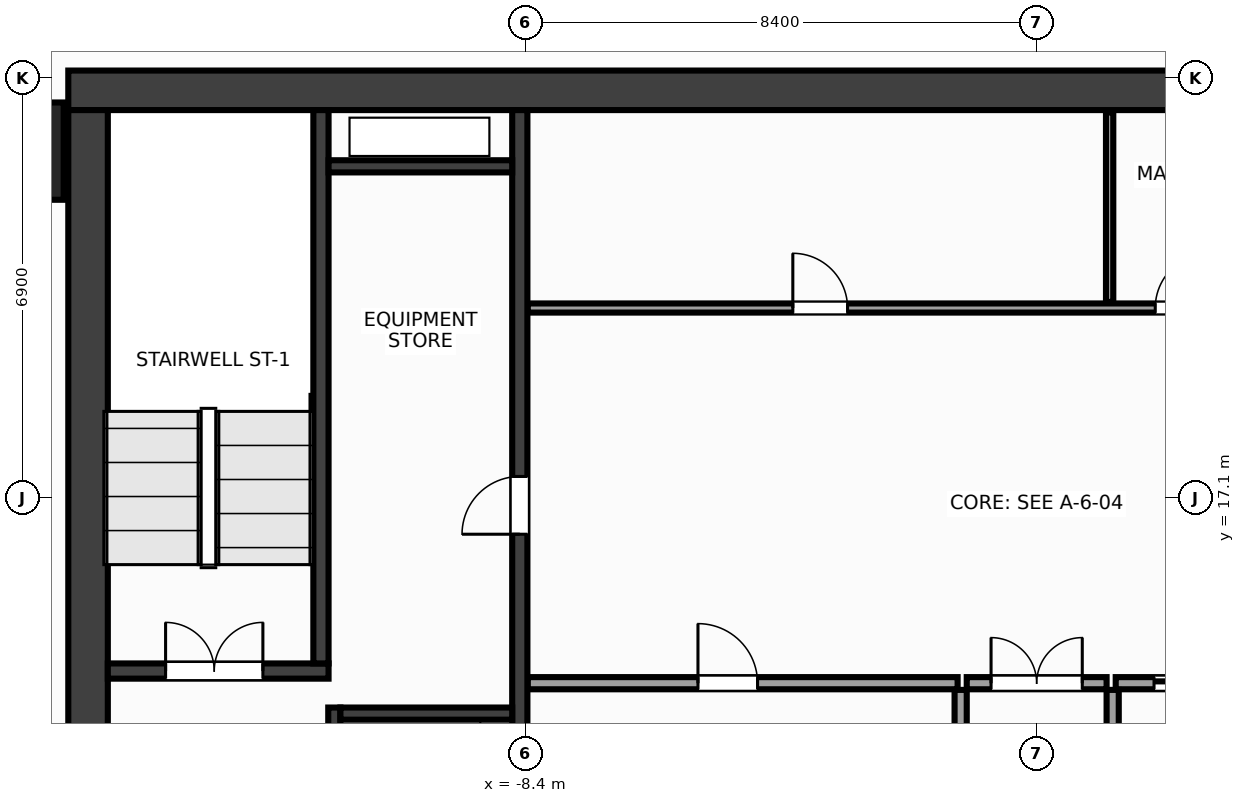
"""IFC4 building model, lengths in metres.
Left out: names, types, materials, properties, quantities, classifications, styles, units other than length and angle.
Written with IfcOpenShell. Run it as: python <this file> out.ifc"""

import sys

from ifc_helpers import new_model, si_unit, direction, frame, frame_2d, origin, origin_2d, place, context, subcontext, project, spatial, rectangle, extrude, source, transform, mapped, element, fill, save


model = new_model("IFC4")
c1 = context("Model", 3, precision=1e-05, world=origin(), true_north=direction((0.0, 1.0)))
c2 = subcontext(c1, "Body", "Model", "MODEL_VIEW")
j1 = project(units=[si_unit("LENGTHUNIT", "METRE"), si_unit("PLANEANGLEUNIT", "RADIAN")], contexts=[c1])
p1 = place(None, origin())
s1 = spatial("IfcSite", under=j1, at=p1, CompositionType="ELEMENT")
p2 = place(p1, origin())
s2 = spatial("IfcBuilding", under=s1, at=p2, CompositionType="ELEMENT")
p3 = place(p2, frame((0.0, 0.0, 88.4)))
s3 = spatial("IfcBuildingStorey", under=s2, at=p3, CompositionType="ELEMENT", Elevation=88.4)
m1 = source(origin(), c2, "Body", "SweptSolid", [
    extrude(rectangle(XDim=31.85, YDim=0.65, at=frame_2d((15.925, 0.0))), origin(), (0.0, 0.0, 1.0), 3.6),
])
p4 = place(p3, frame((-15.925, 23.8, 0.0), z_axis=(0.0, 0.0, 1.0), x_axis=(1.0, 0.0, 0.0)))
e1 = element("IfcWall", 1, at=p4, inside=s3, PredefinedType="SHEAR", context=c2, shape_type="MappedRepresentation", body=[
    mapped(m1, transform((0.0, 0.0, 0.0), x_axis=(1.0, 0.0, 0.0), y_axis=(0.0, 1.0, 0.0), z_axis=(0.0, 0.0, 1.0), scale=1.0)),
])
m2 = source(origin(), c2, "Body", "SweptSolid", [
    extrude(rectangle(XDim=12.95, YDim=0.65, at=frame_2d((6.475, 0.0))), origin(), (0.0, 0.0, 1.0), 3.6),
])
p5 = place(p3, frame((-15.6, 10.525, 0.0), z_axis=(0.0, 0.0, 1.0), x_axis=(0.0, 1.0, 0.0)))
e2 = element("IfcWall", 2, at=p5, inside=s3, PredefinedType="SHEAR", context=c2, shape_type="MappedRepresentation", body=[
    mapped(m2, transform((0.0, 0.0, 0.0), x_axis=(1.0, 0.0, 0.0), y_axis=(0.0, 1.0, 0.0), z_axis=(0.0, 0.0, 1.0), scale=1.0)),
])
m3 = source(origin(), c2, "Body", "SweptSolid", [
    extrude(rectangle(XDim=12.95, YDim=0.25, at=frame_2d((6.475, 0.0))), origin(), (0.0, 0.0, 1.0), 3.6),
])
p6 = place(p3, frame((-8.5, 10.525, 0.0), z_axis=(0.0, 0.0, 1.0), x_axis=(0.0, 1.0, 0.0)))
e3 = element("IfcWall", 3, at=p6, inside=s3, PredefinedType="SHEAR", context=c2, shape_type="MappedRepresentation", body=[
    mapped(m3, transform((0.0, 0.0, 0.0), x_axis=(1.0, 0.0, 0.0), y_axis=(0.0, 1.0, 0.0), z_axis=(0.0, 0.0, 1.0), scale=1.0)),
])
p7 = place(p6, frame((5.975, 0.0, 0.0)))
e4 = element("IfcOpeningElement", 4, at=p7, cuts=e3, PredefinedType="OPENING", context=c2, shape_type="SweptSolid", body=[
    extrude(rectangle(XDim=0.95, YDim=2.15, at=frame_2d((0.475, 1.075))), frame((0.0, 0.137, 0.0), z_axis=(0.0, -1.0, 0.0), x_axis=(1.0, 0.0, 0.0)), (0.0, 0.0, 1.0), 0.274),
])
m4 = source(origin(), c2, "Body", "SweptSolid", [
    extrude(rectangle(XDim=3.63, YDim=0.25, at=frame_2d((1.815, 0.0))), origin(), (0.0, 0.0, 1.0), 3.6),
])
p8 = place(p3, frame((-15.275, 14.25, 0.0), z_axis=(0.0, 0.0, 1.0), x_axis=(1.0, 0.0, 0.0)))
e5 = element("IfcWall", 5, at=p8, inside=s3, PredefinedType="SHEAR", context=c2, shape_type="MappedRepresentation", body=[
    mapped(m4, transform((0.0, 0.0, 0.0), x_axis=(1.0, 0.0, 0.0), y_axis=(0.0, 1.0, 0.0), z_axis=(0.0, 0.0, 1.0), scale=1.0)),
])
p9 = place(p8, frame((0.95, 0.0, 0.0)))
e6 = element("IfcOpeningElement", 6, at=p9, cuts=e5, PredefinedType="OPENING", context=c2, shape_type="SweptSolid", body=[
    extrude(rectangle(XDim=1.6, YDim=2.15, at=frame_2d((0.8, 1.075))), frame((0.0, 0.137, 0.0), z_axis=(0.0, -1.0, 0.0), x_axis=(1.0, 0.0, 0.0)), (0.0, 0.0, 1.0), 0.274),
])
m5 = source(origin(), c2, "Body", "SweptSolid", [
    extrude(rectangle(XDim=9.1, YDim=0.25, at=frame_2d((4.55, 0.0))), origin(), (0.0, 0.0, 1.0), 3.6),
])
p10 = place(p3, frame((-11.77, 14.375, 0.0), z_axis=(0.0, 0.0, 1.0), x_axis=(0.0, 1.0, 0.0)))
e7 = element("IfcWall", 7, at=p10, inside=s3, PredefinedType="SHEAR", context=c2, shape_type="MappedRepresentation", body=[
    mapped(m5, transform((0.0, 0.0, 0.0), x_axis=(1.0, 0.0, 0.0), y_axis=(0.0, 1.0, 0.0), z_axis=(0.0, 0.0, 1.0), scale=1.0)),
])
m6 = source(origin(), c2, "Body", "SweptSolid", [
    extrude(rectangle(XDim=3.125, YDim=0.2, at=frame_2d((1.562, 0.0))), origin(), (0.0, 0.0, 1.0), 3.6),
])
p11 = place(p3, frame((-11.55, 10.525, 0.0), z_axis=(0.0, 0.0, 1.0), x_axis=(0.0, 1.0, 0.0)))
e8 = element("IfcWall", 8, at=p11, inside=s3, PredefinedType="SHEAR", context=c2, shape_type="MappedRepresentation", body=[
    mapped(m6, transform((0.0, 0.0, 0.0), x_axis=(1.0, 0.0, 0.0), y_axis=(0.0, 1.0, 0.0), z_axis=(0.0, 0.0, 1.0), scale=1.0)),
])
p12 = place(p11, frame((0.9, 0.0, 0.0)))
e9 = element("IfcOpeningElement", 9, at=p12, cuts=e8, PredefinedType="OPENING", context=c2, shape_type="SweptSolid", body=[
    extrude(rectangle(XDim=1.1, YDim=2.15, at=frame_2d((0.55, 1.075))), frame((0.0, 0.112, 0.0), z_axis=(0.0, -1.0, 0.0), x_axis=(1.0, 0.0, 0.0)), (0.0, 0.0, 1.0), 0.224),
])
m7 = source(origin(), c2, "Body", "SweptSolid", [
    extrude(rectangle(XDim=2.825, YDim=0.2, at=frame_2d((1.413, 0.0))), origin(), (0.0, 0.0, 1.0), 3.6),
])
p13 = place(p3, frame((-11.45, 13.55, 0.0), z_axis=(0.0, 0.0, 1.0), x_axis=(1.0, 0.0, 0.0)))
e10 = element("IfcWall", 10, at=p13, inside=s3, PredefinedType="SHEAR", context=c2, shape_type="MappedRepresentation", body=[
    mapped(m7, transform((0.0, 0.0, 0.0), x_axis=(1.0, 0.0, 0.0), y_axis=(0.0, 1.0, 0.0), z_axis=(0.0, 0.0, 1.0), scale=1.0)),
])
m8 = source(origin(), c2, "Body", "SweptSolid", [
    extrude(rectangle(XDim=3.02, YDim=0.2, at=frame_2d((1.51, 0.0))), origin(), (0.0, 0.0, 1.0), 3.6),
])
p14 = place(p3, frame((-11.645, 22.55, 0.0), z_axis=(0.0, 0.0, 1.0), x_axis=(1.0, 0.0, 0.0)))
e11 = element("IfcWall", 11, at=p14, inside=s3, PredefinedType="SHEAR", context=c2, shape_type="MappedRepresentation", body=[
    mapped(m8, transform((0.0, 0.0, 0.0), x_axis=(1.0, 0.0, 0.0), y_axis=(0.0, 1.0, 0.0), z_axis=(0.0, 0.0, 1.0), scale=1.0)),
])
m9 = source(origin(), c2, "Body", "SweptSolid", [
    extrude(rectangle(XDim=1.6, YDim=1.6, at=origin_2d()), origin(), (0.0, 0.0, 1.0), 3.6),
])
p15 = place(p3, frame((-16.8, 22.8, 0.0), z_axis=(0.0, 0.0, 1.0), x_axis=(1.0, 0.0, 0.0)))
e12 = element("IfcColumn", 12, at=p15, inside=s3, PredefinedType="COLUMN", context=c2, shape_type="MappedRepresentation", body=[
    mapped(m9, transform((0.0, 0.0, 0.0), x_axis=(1.0, 0.0, 0.0), y_axis=(0.0, 1.0, 0.0), z_axis=(0.0, 0.0, 1.0), scale=1.0)),
])
m10 = source(origin(), c2, "Body", "SweptSolid", [
    extrude(rectangle(XDim=7.07, YDim=0.2, at=frame_2d((3.535, 0.0))), origin(), (0.0, 0.0, 1.0), 3.36),
])
p16 = place(p3, frame((-8.37, 14.05, 0.0), z_axis=(0.0, 0.0, 1.0), x_axis=(1.0, 0.0, 0.0)))
e13 = element("IfcWall", 13, at=p16, inside=s3, PredefinedType="PARTITIONING", context=c2, shape_type="MappedRepresentation", body=[
    mapped(m10, transform((0.0, 0.0, 0.0), x_axis=(1.0, 0.0, 0.0), y_axis=(0.0, 1.0, 0.0), z_axis=(0.0, 0.0, 1.0), scale=1.0)),
])
p17 = place(p16, frame((2.8, 0.0, 0.0)))
e14 = element("IfcOpeningElement", 14, at=p17, cuts=e13, PredefinedType="OPENING", context=c2, shape_type="SweptSolid", body=[
    extrude(rectangle(XDim=0.98, YDim=2.15, at=frame_2d((0.49, 1.075))), frame((0.0, 0.112, 0.0), z_axis=(0.0, -1.0, 0.0), x_axis=(1.0, 0.0, 0.0)), (0.0, 0.0, 1.0), 0.224),
])
p18 = place(p3, frame((1.3, 14.05, 0.0), z_axis=(0.0, 0.0, 1.0), x_axis=(1.0, 0.0, 0.0)))
e15 = element("IfcWall", 15, at=p18, inside=s3, PredefinedType="PARTITIONING", context=c2, shape_type="MappedRepresentation", body=[
    mapped(m10, transform((0.0, 0.0, 0.0), x_axis=(1.0, 0.0, 0.0), y_axis=(0.0, 1.0, 0.0), z_axis=(0.0, 0.0, 1.0), scale=1.0)),
])
p19 = place(p18, frame((0.63, 0.0, 0.0)))
e16 = element("IfcOpeningElement", 16, at=p19, cuts=e15, PredefinedType="OPENING", context=c2, shape_type="SweptSolid", body=[
    extrude(rectangle(XDim=1.1, YDim=2.15, at=frame_2d((0.55, 1.075))), frame((0.0, 0.112, 0.0), z_axis=(0.0, -1.0, 0.0), x_axis=(1.0, 0.0, 0.0)), (0.0, 0.0, 1.0), 0.224),
])
p20 = place(p18, frame((2.98, 0.0, 0.0)))
e17 = element("IfcOpeningElement", 17, at=p20, cuts=e15, PredefinedType="OPENING", context=c2, shape_type="SweptSolid", body=[
    extrude(rectangle(XDim=1.1, YDim=2.15, at=frame_2d((0.55, 1.075))), frame((0.0, 0.112, 0.0), z_axis=(0.0, -1.0, 0.0), x_axis=(1.0, 0.0, 0.0)), (0.0, 0.0, 1.0), 0.224),
])
p21 = place(p18, frame((5.33, 0.0, 0.0)))
e18 = element("IfcOpeningElement", 18, at=p21, cuts=e15, PredefinedType="OPENING", context=c2, shape_type="SweptSolid", body=[
    extrude(rectangle(XDim=1.1, YDim=2.15, at=frame_2d((0.55, 1.075))), frame((0.0, 0.112, 0.0), z_axis=(0.0, -1.0, 0.0), x_axis=(1.0, 0.0, 0.0)), (0.0, 0.0, 1.0), 0.224),
])
m11 = source(origin(), c2, "Body", "SweptSolid", [
    extrude(rectangle(XDim=3.415, YDim=0.2, at=frame_2d((1.708, 0.0))), origin(), (0.0, 0.0, 1.0), 3.36),
])
for number, where, z_axis, x_axis in (
    (19, (-1.25, 10.525, 0.0), (0.0, 0.0, 1.0), (0.0, 1.0, 0.0)),
    (20, (1.25, 10.525, 0.0), (0.0, 0.0, 1.0), (0.0, 1.0, 0.0)),
):
    element("IfcWall", number, at=place(p3, frame(where, z_axis=z_axis, x_axis=x_axis)), inside=s3, PredefinedType="PARTITIONING", context=c2, shape_type="MappedRepresentation", body=[
        mapped(m11, transform((0.0, 0.0, 0.0), x_axis=(1.0, 0.0, 0.0), y_axis=(0.0, 1.0, 0.0), z_axis=(0.0, 0.0, 1.0), scale=1.0)),
    ])
m12 = source(origin(), c2, "Body", "SweptSolid", [
    extrude(rectangle(XDim=2.3, YDim=0.2, at=frame_2d((1.15, 0.0))), origin(), (0.0, 0.0, 1.0), 3.36),
])
p22 = place(p3, frame((-1.15, 14.05, 0.0), z_axis=(0.0, 0.0, 1.0), x_axis=(1.0, 0.0, 0.0)))
e21 = element("IfcWall", 21, at=p22, inside=s3, PredefinedType="PARTITIONING", context=c2, shape_type="MappedRepresentation", body=[
    mapped(m12, transform((0.0, 0.0, 0.0), x_axis=(1.0, 0.0, 0.0), y_axis=(0.0, 1.0, 0.0), z_axis=(0.0, 0.0, 1.0), scale=1.0)),
])
p23 = place(p22, frame((0.4, 0.0, 0.0)))
e22 = element("IfcOpeningElement", 22, at=p23, cuts=e21, PredefinedType="OPENING", context=c2, shape_type="SweptSolid", body=[
    extrude(rectangle(XDim=1.5, YDim=2.2, at=frame_2d((0.75, 1.1))), frame((0.0, 0.112, 0.0), z_axis=(0.0, -1.0, 0.0), x_axis=(1.0, 0.0, 0.0)), (0.0, 0.0, 1.0), 0.224),
])
m13 = source(origin(), c2, "Body", "SweptSolid", [
    extrude(rectangle(XDim=14.59, YDim=0.15, at=frame_2d((7.295, 0.0))), origin(), (0.0, 0.0, 1.0), 3.36),
])
p24 = place(p3, frame((-8.37, 20.22, 0.0), z_axis=(0.0, 0.0, 1.0), x_axis=(1.0, 0.0, 0.0)))
e23 = element("IfcWall", 23, at=p24, inside=s3, PredefinedType="PARTITIONING", context=c2, shape_type="MappedRepresentation", body=[
    mapped(m13, transform((0.0, 0.0, 0.0), x_axis=(1.0, 0.0, 0.0), y_axis=(0.0, 1.0, 0.0), z_axis=(0.0, 0.0, 1.0), scale=1.0)),
])
p25 = place(p24, frame((4.36, 0.0, 0.0)))
e24 = element("IfcOpeningElement", 24, at=p25, cuts=e23, PredefinedType="OPENING", context=c2, shape_type="SweptSolid", body=[
    extrude(rectangle(XDim=0.9, YDim=2.15, at=frame_2d((0.45, 1.075))), frame((0.0, 0.087, 0.0), z_axis=(0.0, -1.0, 0.0), x_axis=(1.0, 0.0, 0.0)), (0.0, 0.0, 1.0), 0.174),
])
p26 = place(p24, frame((10.32, 0.0, 0.0)))
e25 = element("IfcOpeningElement", 25, at=p26, cuts=e23, PredefinedType="OPENING", context=c2, shape_type="SweptSolid", body=[
    extrude(rectangle(XDim=0.9, YDim=2.15, at=frame_2d((0.45, 1.075))), frame((0.0, 0.087, 0.0), z_axis=(0.0, -1.0, 0.0), x_axis=(1.0, 0.0, 0.0)), (0.0, 0.0, 1.0), 0.174),
])
p27 = place(p24, frame((12.77, 0.0, 0.0)))
e26 = element("IfcOpeningElement", 26, at=p27, cuts=e23, PredefinedType="OPENING", context=c2, shape_type="SweptSolid", body=[
    extrude(rectangle(XDim=0.9, YDim=2.15, at=frame_2d((0.45, 1.075))), frame((0.0, 0.087, 0.0), z_axis=(0.0, -1.0, 0.0), x_axis=(1.0, 0.0, 0.0)), (0.0, 0.0, 1.0), 0.174),
])
m14 = source(origin(), c2, "Body", "SweptSolid", [
    extrude(rectangle(XDim=3.115, YDim=0.12, at=frame_2d((1.558, 0.0))), origin(), (0.0, 0.0, 1.0), 3.36),
])
p28 = place(p3, frame((1.2, 20.32, 0.0), z_axis=(0.0, 0.0, 1.0), x_axis=(0.0, 1.0, 0.0)))
e27 = element("IfcWall", 27, at=p28, inside=s3, PredefinedType="PARTITIONING", context=c2, shape_type="MappedRepresentation", body=[
    mapped(m14, transform((0.0, 0.0, 0.0), x_axis=(1.0, 0.0, 0.0), y_axis=(0.0, 1.0, 0.0), z_axis=(0.0, 0.0, 1.0), scale=1.0)),
])
m15 = source(origin(), c2, "Body", "SweptSolid", [
    extrude(rectangle(XDim=1.6, YDim=2.15, at=frame_2d((0.8, 1.075))), frame((0.0, 0.025, 0.0), z_axis=(0.0, -1.0, 0.0), x_axis=(1.0, 0.0, 0.0)), (0.0, 0.0, 1.0), 0.05),
])
p29 = place(p9, origin())
e28 = element("IfcDoor", 28, at=p29, inside=s3, OperationType="DOUBLE_DOOR_SINGLE_SWING", PredefinedType="DOOR", context=c2, shape_type="MappedRepresentation", body=[
    mapped(m15, transform((0.0, 0.0, 0.0), x_axis=(1.0, 0.0, 0.0), y_axis=(0.0, 1.0, 0.0), z_axis=(0.0, 0.0, 1.0), scale=1.0)),
])
fill(e6, e28)
m16 = source(origin(), c2, "Body", "SweptSolid", [
    extrude(rectangle(XDim=0.95, YDim=2.15, at=frame_2d((0.475, 1.075))), frame((0.0, 0.025, 0.0), z_axis=(0.0, -1.0, 0.0), x_axis=(1.0, 0.0, 0.0)), (0.0, 0.0, 1.0), 0.05),
])
p30 = place(p7, origin())
e29 = element("IfcDoor", 29, at=p30, inside=s3, OperationType="SINGLE_SWING_LEFT", PredefinedType="DOOR", context=c2, shape_type="MappedRepresentation", body=[
    mapped(m16, transform((0.0, 0.0, 0.0), x_axis=(1.0, 0.0, 0.0), y_axis=(0.0, 1.0, 0.0), z_axis=(0.0, 0.0, 1.0), scale=1.0)),
])
fill(e4, e29)
m17 = source(origin(), c2, "Body", "SweptSolid", [
    extrude(rectangle(XDim=0.98, YDim=2.15, at=frame_2d((0.49, 1.075))), frame((0.0, 0.025, 0.0), z_axis=(0.0, -1.0, 0.0), x_axis=(1.0, 0.0, 0.0)), (0.0, 0.0, 1.0), 0.05),
])
p31 = place(p17, origin())
e30 = element("IfcDoor", 30, at=p31, inside=s3, OperationType="SINGLE_SWING_LEFT", PredefinedType="DOOR", context=c2, shape_type="MappedRepresentation", body=[
    mapped(m17, transform((0.0, 0.0, 0.0), x_axis=(1.0, 0.0, 0.0), y_axis=(0.0, 1.0, 0.0), z_axis=(0.0, 0.0, 1.0), scale=1.0)),
])
fill(e14, e30)
m18 = source(origin(), c2, "Body", "SweptSolid", [
    extrude(rectangle(XDim=1.1, YDim=2.15, at=frame_2d((0.55, 1.075))), frame((0.0, 0.025, 0.0), z_axis=(0.0, -1.0, 0.0), x_axis=(1.0, 0.0, 0.0)), (0.0, 0.0, 1.0), 0.05),
])
p32 = place(p19, origin())
e31 = element("IfcDoor", 31, at=p32, inside=s3, OperationType="DOUBLE_DOOR_SLIDING", PredefinedType="DOOR", context=c2, shape_type="MappedRepresentation", body=[
    mapped(m18, transform((0.0, 0.0, 0.0), x_axis=(1.0, 0.0, 0.0), y_axis=(0.0, 1.0, 0.0), z_axis=(0.0, 0.0, 1.0), scale=1.0)),
])
fill(e16, e31)
m19 = source(origin(), c2, "Body", "SweptSolid", [
    extrude(rectangle(XDim=1.5, YDim=2.2, at=frame_2d((0.75, 1.1))), frame((0.0, 0.025, 0.0), z_axis=(0.0, -1.0, 0.0), x_axis=(1.0, 0.0, 0.0)), (0.0, 0.0, 1.0), 0.05),
])
p33 = place(p23, origin())
e32 = element("IfcDoor", 32, at=p33, inside=s3, OperationType="DOUBLE_DOOR_SINGLE_SWING", PredefinedType="DOOR", context=c2, shape_type="MappedRepresentation", body=[
    mapped(m19, transform((0.0, 0.0, 0.0), x_axis=(1.0, 0.0, 0.0), y_axis=(0.0, 1.0, 0.0), z_axis=(0.0, 0.0, 1.0), scale=1.0)),
])
fill(e22, e32)
m20 = source(origin(), c2, "Body", "SweptSolid", [
    extrude(rectangle(XDim=0.9, YDim=2.15, at=frame_2d((0.45, 1.075))), frame((0.0, 0.025, 0.0), z_axis=(0.0, -1.0, 0.0), x_axis=(1.0, 0.0, 0.0)), (0.0, 0.0, 1.0), 0.05),
])
p34 = place(p25, origin())
e33 = element("IfcDoor", 33, at=p34, inside=s3, OperationType="SINGLE_SWING_LEFT", PredefinedType="DOOR", context=c2, shape_type="MappedRepresentation", body=[
    mapped(m20, transform((0.0, 0.0, 0.0), x_axis=(1.0, 0.0, 0.0), y_axis=(0.0, 1.0, 0.0), z_axis=(0.0, 0.0, 1.0), scale=1.0)),
])
fill(e24, e33)
p35 = place(p26, origin())
e34 = element("IfcDoor", 34, at=p35, inside=s3, OperationType="SINGLE_SWING_RIGHT", PredefinedType="DOOR", context=c2, shape_type="MappedRepresentation", body=[
    mapped(m20, transform((0.0, 0.0, 0.0), x_axis=(1.0, 0.0, 0.0), y_axis=(0.0, 1.0, 0.0), z_axis=(0.0, 0.0, 1.0), scale=1.0)),
])
fill(e25, e34)
save(model, sys.argv[1])
